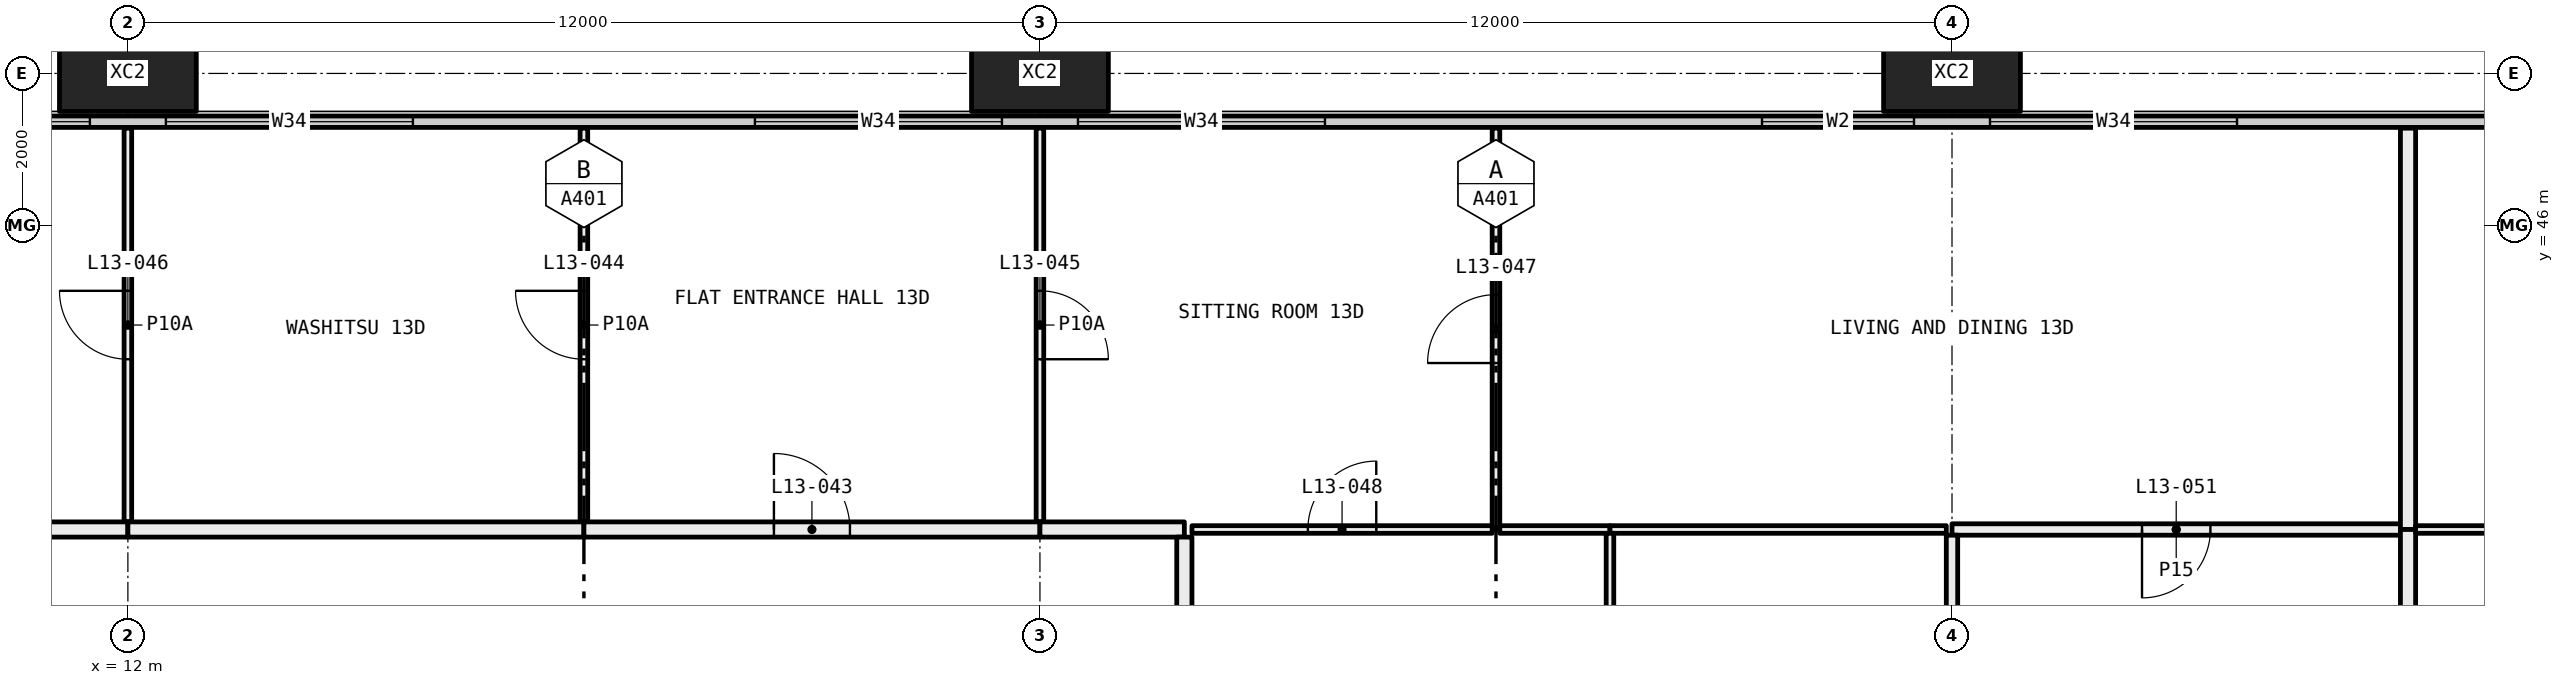
"""IFC4 building model, lengths in metres.
Left out: names, types, materials, properties, quantities, classifications, styles, units other than length and angle.
Written with IfcOpenShell. Run it as: python <this file> out.ifc"""

import sys

from ifc_helpers import new_model, si_unit, direction, frame, frame_2d, origin, origin_2d, place, context, subcontext, project, spatial, rectangle, hollow_rectangle, extrude, element, fill, save


model = new_model("IFC4")
c1 = context("Model", 3, precision=1e-05, world=origin(), true_north=direction((0.0, 1.0)))
c2 = subcontext(c1, "Body", "Model", "MODEL_VIEW")
j1 = project(units=[si_unit("LENGTHUNIT", "METRE"), si_unit("PLANEANGLEUNIT", "RADIAN")], contexts=[c1])
p1 = place(None, origin())
s1 = spatial("IfcSite", under=j1, at=p1, CompositionType="ELEMENT")
p2 = place(p1, origin())
s2 = spatial("IfcBuilding", under=s1, at=p2, CompositionType="ELEMENT")
p3 = place(p2, frame((0.0, 0.0, 57.6)))
s3 = spatial("IfcBuildingStorey", under=s2, at=p3, CompositionType="ELEMENT", Elevation=57.6)
for number, where, z_axis, x_axis in (
    (1, (12.0, 48.0, -0.4), (0.0, 0.0, 1.0), (1.0, 0.0, 0.0)),
    (2, (24.0, 48.0, -0.4), (0.0, 0.0, 1.0), (1.0, 0.0, 0.0)),
    (3, (36.0, 48.0, -0.4), (0.0, 0.0, 1.0), (1.0, 0.0, 0.0)),
):
    element("IfcColumn", number, at=place(p3, frame(where, z_axis=z_axis, x_axis=x_axis)), inside=s3, PredefinedType="COLUMN", context=c2, shape_type="SweptSolid", body=[
        extrude(hollow_rectangle(XDim=1.8, YDim=1.0, WallThickness=0.07, at=origin_2d()), origin(), (0.0, 0.0, 1.0), 3.45),
    ])
p4 = place(p3, frame((6.56, 47.365, 0.0), z_axis=(0.0, 0.0, 1.0), x_axis=(1.0, 0.0, 0.0)))
e4 = element("IfcWall", 4, at=p4, inside=s3, PredefinedType="ELEMENTEDWALL", context=c2, shape_type="SweptSolid", body=[
    extrude(rectangle(XDim=58.88, YDim=0.15, at=frame_2d((29.44, 0.0))), origin(), (0.0, 0.0, 1.0), 3.05),
])
p5 = place(p4, frame((0.44, 0.0, 0.45)))
e5 = element("IfcOpeningElement", 5, at=p5, cuts=e4, PredefinedType="OPENING", context=c2, shape_type="SweptSolid", body=[
    extrude(rectangle(XDim=4.5, YDim=2.55, at=frame_2d((2.25, 1.275))), frame((0.0, 0.085, 0.0), z_axis=(0.0, -1.0, 0.0), x_axis=(1.0, 0.0, 0.0)), (0.0, 0.0, 1.0), 0.17),
])
p6 = place(p4, frame((5.94, 0.0, 0.45)))
e6 = element("IfcOpeningElement", 6, at=p6, cuts=e4, PredefinedType="OPENING", context=c2, shape_type="SweptSolid", body=[
    extrude(rectangle(XDim=3.25, YDim=2.55, at=frame_2d((1.625, 1.275))), frame((0.0, 0.085, 0.0), z_axis=(0.0, -1.0, 0.0), x_axis=(1.0, 0.0, 0.0)), (0.0, 0.0, 1.0), 0.17),
])
p7 = place(p4, frame((13.69, 0.0, 0.45)))
e7 = element("IfcOpeningElement", 7, at=p7, cuts=e4, PredefinedType="OPENING", context=c2, shape_type="SweptSolid", body=[
    extrude(rectangle(XDim=3.25, YDim=2.55, at=frame_2d((1.625, 1.275))), frame((0.0, 0.085, 0.0), z_axis=(0.0, -1.0, 0.0), x_axis=(1.0, 0.0, 0.0)), (0.0, 0.0, 1.0), 0.17),
])
p8 = place(p4, frame((17.94, 0.0, 0.45)))
e8 = element("IfcOpeningElement", 8, at=p8, cuts=e4, PredefinedType="OPENING", context=c2, shape_type="SweptSolid", body=[
    extrude(rectangle(XDim=3.25, YDim=2.55, at=frame_2d((1.625, 1.275))), frame((0.0, 0.085, 0.0), z_axis=(0.0, -1.0, 0.0), x_axis=(1.0, 0.0, 0.0)), (0.0, 0.0, 1.0), 0.17),
])
p9 = place(p4, frame((26.94, 0.0, 0.45)))
e9 = element("IfcOpeningElement", 9, at=p9, cuts=e4, PredefinedType="OPENING", context=c2, shape_type="SweptSolid", body=[
    extrude(rectangle(XDim=2.0, YDim=2.55, at=frame_2d((1.0, 1.275))), frame((0.0, 0.085, 0.0), z_axis=(0.0, -1.0, 0.0), x_axis=(1.0, 0.0, 0.0)), (0.0, 0.0, 1.0), 0.17),
])
p10 = place(p4, frame((29.94, 0.0, 0.45)))
e10 = element("IfcOpeningElement", 10, at=p10, cuts=e4, PredefinedType="OPENING", context=c2, shape_type="SweptSolid", body=[
    extrude(rectangle(XDim=3.25, YDim=2.55, at=frame_2d((1.625, 1.275))), frame((0.0, 0.085, 0.0), z_axis=(0.0, -1.0, 0.0), x_axis=(1.0, 0.0, 0.0)), (0.0, 0.0, 1.0), 0.17),
])
p11 = place(p4, frame((37.69, 0.0, 0.45)))
e11 = element("IfcOpeningElement", 11, at=p11, cuts=e4, PredefinedType="OPENING", context=c2, shape_type="SweptSolid", body=[
    extrude(rectangle(XDim=3.25, YDim=2.55, at=frame_2d((1.625, 1.275))), frame((0.0, 0.085, 0.0), z_axis=(0.0, -1.0, 0.0), x_axis=(1.0, 0.0, 0.0)), (0.0, 0.0, 1.0), 0.17),
])
p12 = place(p4, frame((41.94, 0.0, 0.45)))
e12 = element("IfcOpeningElement", 12, at=p12, cuts=e4, PredefinedType="OPENING", context=c2, shape_type="SweptSolid", body=[
    extrude(rectangle(XDim=3.25, YDim=2.55, at=frame_2d((1.625, 1.275))), frame((0.0, 0.085, 0.0), z_axis=(0.0, -1.0, 0.0), x_axis=(1.0, 0.0, 0.0)), (0.0, 0.0, 1.0), 0.17),
])
p13 = place(p4, frame((50.94, 0.0, 0.45)))
e13 = element("IfcOpeningElement", 13, at=p13, cuts=e4, PredefinedType="OPENING", context=c2, shape_type="SweptSolid", body=[
    extrude(rectangle(XDim=2.0, YDim=2.55, at=frame_2d((1.0, 1.275))), frame((0.0, 0.085, 0.0), z_axis=(0.0, -1.0, 0.0), x_axis=(1.0, 0.0, 0.0)), (0.0, 0.0, 1.0), 0.17),
])
p14 = place(p4, frame((53.94, 0.0, 0.45)))
e14 = element("IfcOpeningElement", 14, at=p14, cuts=e4, PredefinedType="OPENING", context=c2, shape_type="SweptSolid", body=[
    extrude(rectangle(XDim=4.5, YDim=2.55, at=frame_2d((2.25, 1.275))), frame((0.0, 0.085, 0.0), z_axis=(0.0, -1.0, 0.0), x_axis=(1.0, 0.0, 0.0)), (0.0, 0.0, 1.0), 0.17),
])
p15 = place(p3, frame((12.0, 42.1, 0.0), z_axis=(0.0, 0.0, 1.0), x_axis=(0.0, 1.0, 0.0)))
e15 = element("IfcWall", 15, at=p15, inside=s3, PredefinedType="PARTITIONING", context=c2, shape_type="SweptSolid", body=[
    extrude(rectangle(XDim=5.18, YDim=0.1, at=frame_2d((2.59, 0.0))), origin(), (0.0, 0.0, 1.0), 3.05),
])
p16 = place(p15, frame((2.14, 0.0, 0.0)))
e16 = element("IfcOpeningElement", 16, at=p16, cuts=e15, PredefinedType="OPENING", context=c2, shape_type="SweptSolid", body=[
    extrude(rectangle(XDim=0.9, YDim=2.1, at=frame_2d((0.45, 1.05))), frame((0.0, 0.06, 0.0), z_axis=(0.0, -1.0, 0.0), x_axis=(1.0, 0.0, 0.0)), (0.0, 0.0, 1.0), 0.12),
])
p17 = place(p3, frame((10.1, 42.0, 0.0), z_axis=(0.0, 0.0, 1.0), x_axis=(1.0, 0.0, 0.0)))
e17 = element("IfcWall", 17, at=p17, inside=s3, PredefinedType="PARTITIONING", context=c2, shape_type="SweptSolid", body=[
    extrude(rectangle(XDim=1.9, YDim=0.2, at=frame_2d((0.95, 0.0))), origin(), (0.0, 0.0, 1.0), 3.05),
])
p18 = place(p3, frame((18.0, 42.1, 0.0), z_axis=(0.0, 0.0, 1.0), x_axis=(0.0, 1.0, 0.0)))
e18 = element("IfcWall", 18, at=p18, inside=s3, PredefinedType="PARTITIONING", context=c2, shape_type="SweptSolid", body=[
    extrude(rectangle(XDim=5.18, YDim=0.1, at=frame_2d((2.59, 0.0))), origin(), (0.0, 0.0, 1.0), 3.05),
])
p19 = place(p18, frame((2.14, 0.0, 0.0)))
e19 = element("IfcOpeningElement", 19, at=p19, cuts=e18, PredefinedType="OPENING", context=c2, shape_type="SweptSolid", body=[
    extrude(rectangle(XDim=0.9, YDim=2.1, at=frame_2d((0.45, 1.05))), frame((0.0, 0.06, 0.0), z_axis=(0.0, -1.0, 0.0), x_axis=(1.0, 0.0, 0.0)), (0.0, 0.0, 1.0), 0.12),
])
p20 = place(p3, frame((12.0, 42.0, 0.0), z_axis=(0.0, 0.0, 1.0), x_axis=(1.0, 0.0, 0.0)))
e20 = element("IfcWall", 20, at=p20, inside=s3, PredefinedType="PARTITIONING", context=c2, shape_type="SweptSolid", body=[
    extrude(rectangle(XDim=6.0, YDim=0.2, at=frame_2d((3.0, 0.0))), origin(), (0.0, 0.0, 1.0), 3.05),
])
p21 = place(p3, frame((24.0, 42.1, 0.0), z_axis=(0.0, 0.0, 1.0), x_axis=(0.0, 1.0, 0.0)))
e21 = element("IfcWall", 21, at=p21, inside=s3, PredefinedType="PARTITIONING", context=c2, shape_type="SweptSolid", body=[
    extrude(rectangle(XDim=5.18, YDim=0.1, at=frame_2d((2.59, 0.0))), origin(), (0.0, 0.0, 1.0), 3.05),
])
p22 = place(p21, frame((2.14, 0.0, 0.0)))
e22 = element("IfcOpeningElement", 22, at=p22, cuts=e21, PredefinedType="OPENING", context=c2, shape_type="SweptSolid", body=[
    extrude(rectangle(XDim=0.9, YDim=2.1, at=frame_2d((0.45, 1.05))), frame((0.0, 0.06, 0.0), z_axis=(0.0, -1.0, 0.0), x_axis=(1.0, 0.0, 0.0)), (0.0, 0.0, 1.0), 0.12),
])
p23 = place(p3, frame((18.0, 42.0, 0.0), z_axis=(0.0, 0.0, 1.0), x_axis=(1.0, 0.0, 0.0)))
e23 = element("IfcWall", 23, at=p23, inside=s3, PredefinedType="PARTITIONING", context=c2, shape_type="SweptSolid", body=[
    extrude(rectangle(XDim=6.0, YDim=0.2, at=frame_2d((3.0, 0.0))), origin(), (0.0, 0.0, 1.0), 3.05),
])
p24 = place(p23, frame((2.5, 0.0, 0.0)))
e24 = element("IfcOpeningElement", 24, at=p24, cuts=e23, PredefinedType="OPENING", context=c2, shape_type="SweptSolid", body=[
    extrude(rectangle(XDim=1.0, YDim=2.1, at=frame_2d((0.5, 1.05))), frame((0.0, 0.11, 0.0), z_axis=(0.0, -1.0, 0.0), x_axis=(1.0, 0.0, 0.0)), (0.0, 0.0, 1.0), 0.22),
])
p25 = place(p3, frame((30.0, 42.0, 0.0), z_axis=(0.0, 0.0, 1.0), x_axis=(0.0, 1.0, 0.0)))
e25 = element("IfcWall", 25, at=p25, inside=s3, PredefinedType="PARTITIONING", context=c2, shape_type="SweptSolid", body=[
    extrude(rectangle(XDim=5.28, YDim=0.1, at=frame_2d((2.64, 0.0))), origin(), (0.0, 0.0, 1.0), 3.05),
])
p26 = place(p25, frame((2.19, 0.0, 0.0)))
e26 = element("IfcOpeningElement", 26, at=p26, cuts=e25, PredefinedType="OPENING", context=c2, shape_type="SweptSolid", body=[
    extrude(rectangle(XDim=0.9, YDim=2.1, at=frame_2d((0.45, 1.05))), frame((0.0, 0.06, 0.0), z_axis=(0.0, -1.0, 0.0), x_axis=(1.0, 0.0, 0.0)), (0.0, 0.0, 1.0), 0.12),
])
p27 = place(p3, frame((26.0, 42.0, 0.0), z_axis=(0.0, 0.0, 1.0), x_axis=(1.0, 0.0, 0.0)))
e27 = element("IfcWall", 27, at=p27, inside=s3, PredefinedType="PARTITIONING", context=c2, shape_type="SweptSolid", body=[
    extrude(rectangle(XDim=3.95, YDim=0.1, at=frame_2d((1.975, 0.0))), origin(), (0.0, 0.0, 1.0), 3.05),
])
p28 = place(p27, frame((1.525, 0.0, 0.0)))
e28 = element("IfcOpeningElement", 28, at=p28, cuts=e27, PredefinedType="OPENING", context=c2, shape_type="SweptSolid", body=[
    extrude(rectangle(XDim=0.9, YDim=2.1, at=frame_2d((0.45, 1.05))), frame((0.0, 0.06, 0.0), z_axis=(0.0, -1.0, 0.0), x_axis=(1.0, 0.0, 0.0)), (0.0, 0.0, 1.0), 0.12),
])
p29 = place(p3, frame((24.0, 42.0, 0.0), z_axis=(0.0, 0.0, 1.0), x_axis=(1.0, 0.0, 0.0)))
e29 = element("IfcWall", 29, at=p29, inside=s3, PredefinedType="PARTITIONING", context=c2, shape_type="SweptSolid", body=[
    extrude(rectangle(XDim=1.9, YDim=0.2, at=frame_2d((0.95, 0.0))), origin(), (0.0, 0.0, 1.0), 3.05),
])
p30 = place(p3, frame((30.05, 42.0, 0.0), z_axis=(0.0, 0.0, 1.0), x_axis=(1.0, 0.0, 0.0)))
e30 = element("IfcWall", 30, at=p30, inside=s3, PredefinedType="PARTITIONING", context=c2, shape_type="SweptSolid", body=[
    extrude(rectangle(XDim=1.45, YDim=0.1, at=frame_2d((0.725, 0.0))), origin(), (0.0, 0.0, 1.0), 3.05),
])
p31 = place(p3, frame((31.5, 42.0, 0.0), z_axis=(0.0, 0.0, 1.0), x_axis=(1.0, 0.0, 0.0)))
e31 = element("IfcWall", 31, at=p31, inside=s3, PredefinedType="PARTITIONING", context=c2, shape_type="SweptSolid", body=[
    extrude(rectangle(XDim=4.425, YDim=0.1, at=frame_2d((2.212, 0.0))), origin(), (0.0, 0.0, 1.0), 2.45),
])
p32 = place(p3, frame((36.0, 42.0, 0.0), z_axis=(0.0, 0.0, 1.0), x_axis=(1.0, 0.0, 0.0)))
e32 = element("IfcWall", 32, at=p32, inside=s3, PredefinedType="PARTITIONING", context=c2, shape_type="SweptSolid", body=[
    extrude(rectangle(XDim=5.9, YDim=0.15, at=frame_2d((2.95, 0.0))), origin(), (0.0, 0.0, 1.0), 2.45),
])
p33 = place(p32, frame((2.5, 0.0, 0.0)))
e33 = element("IfcOpeningElement", 33, at=p33, cuts=e32, PredefinedType="OPENING", context=c2, shape_type="SweptSolid", body=[
    extrude(rectangle(XDim=0.9, YDim=2.1, at=frame_2d((0.45, 1.05))), frame((0.0, 0.085, 0.0), z_axis=(0.0, -1.0, 0.0), x_axis=(1.0, 0.0, 0.0)), (0.0, 0.0, 1.0), 0.17),
])
p34 = place(p3, frame((42.0, 42.0, 0.0), z_axis=(0.0, 0.0, 1.0), x_axis=(0.0, 1.0, 0.0)))
e34 = element("IfcWall", 34, at=p34, inside=s3, PredefinedType="PARTITIONING", context=c2, shape_type="SweptSolid", body=[
    extrude(rectangle(XDim=5.28, YDim=0.2, at=frame_2d((2.64, 0.0))), origin(), (0.0, 0.0, 1.0), 3.05),
])
p35 = place(p3, frame((31.5, 36.1, 0.0), z_axis=(0.0, 0.0, 1.0), x_axis=(0.0, 1.0, 0.0)))
e35 = element("IfcWall", 35, at=p35, inside=s3, PredefinedType="PARTITIONING", context=c2, shape_type="SweptSolid", body=[
    extrude(rectangle(XDim=5.85, YDim=0.1, at=frame_2d((2.925, 0.0))), origin(), (0.0, 0.0, 1.0), 3.05),
])
p36 = place(p35, frame((2.475, 0.0, 0.0)))
e36 = element("IfcOpeningElement", 36, at=p36, cuts=e35, PredefinedType="OPENING", context=c2, shape_type="SweptSolid", body=[
    extrude(rectangle(XDim=0.9, YDim=2.1, at=frame_2d((0.45, 1.05))), frame((0.0, 0.06, 0.0), z_axis=(0.0, -1.0, 0.0), x_axis=(1.0, 0.0, 0.0)), (0.0, 0.0, 1.0), 0.12),
])
p37 = place(p3, frame((25.9, 41.9, 0.0), z_axis=(0.0, 0.0, 1.0), x_axis=(0.0, -1.0, 0.0)))
e37 = element("IfcWall", 37, at=p37, inside=s3, PredefinedType="PARTITIONING", context=c2, shape_type="SweptSolid", body=[
    extrude(rectangle(XDim=6.2, YDim=0.2, at=frame_2d((3.1, 0.0))), origin(), (0.0, 0.0, 1.0), 2.45),
])
p38 = place(p3, frame((36.0, 38.1, 0.0), z_axis=(0.0, 0.0, 1.0), x_axis=(0.0, 1.0, 0.0)))
e38 = element("IfcWall", 38, at=p38, inside=s3, PredefinedType="PARTITIONING", context=c2, shape_type="SweptSolid", body=[
    extrude(rectangle(XDim=3.825, YDim=0.15, at=frame_2d((1.913, 0.0))), origin(), (0.0, 0.0, 1.0), 2.45),
])
p39 = place(p3, frame((42.0, 38.1, 0.0), z_axis=(0.0, 0.0, 1.0), x_axis=(0.0, 1.0, 0.0)))
e39 = element("IfcWall", 39, at=p39, inside=s3, PredefinedType="PARTITIONING", context=c2, shape_type="SweptSolid", body=[
    extrude(rectangle(XDim=3.9, YDim=0.2, at=frame_2d((1.95, 0.0))), origin(), (0.0, 0.0, 1.0), 3.05),
])
p40 = place(p3, frame((42.1, 42.0, 0.0), z_axis=(0.0, 0.0, 1.0), x_axis=(1.0, 0.0, 0.0)))
e40 = element("IfcWall", 40, at=p40, inside=s3, PredefinedType="PARTITIONING", context=c2, shape_type="SweptSolid", body=[
    extrude(rectangle(XDim=3.9, YDim=0.1, at=frame_2d((1.95, 0.0))), origin(), (0.0, 0.0, 1.0), 3.05),
])
p41 = place(p40, frame((1.5, 0.0, 0.0)))
e41 = element("IfcOpeningElement", 41, at=p41, cuts=e40, PredefinedType="OPENING", context=c2, shape_type="SweptSolid", body=[
    extrude(rectangle(XDim=0.9, YDim=2.1, at=frame_2d((0.45, 1.05))), frame((0.0, 0.06, 0.0), z_axis=(0.0, -1.0, 0.0), x_axis=(1.0, 0.0, 0.0)), (0.0, 0.0, 1.0), 0.12),
])
p42 = place(p5, origin())
e42 = element("IfcWindow", 42, at=p42, inside=s3, PartitioningType="SINGLE_PANEL", PredefinedType="WINDOW", context=c2, shape_type="SweptSolid", body=[
    extrude(rectangle(XDim=4.5, YDim=2.55, at=frame_2d((2.25, 1.275))), frame((0.0, 0.03, 0.0), z_axis=(0.0, -1.0, 0.0), x_axis=(1.0, 0.0, 0.0)), (0.0, 0.0, 1.0), 0.06),
])
fill(e5, e42)
p43 = place(p6, origin())
e43 = element("IfcWindow", 43, at=p43, inside=s3, PartitioningType="SINGLE_PANEL", PredefinedType="WINDOW", context=c2, shape_type="SweptSolid", body=[
    extrude(rectangle(XDim=3.25, YDim=2.55, at=frame_2d((1.625, 1.275))), frame((0.0, 0.03, 0.0), z_axis=(0.0, -1.0, 0.0), x_axis=(1.0, 0.0, 0.0)), (0.0, 0.0, 1.0), 0.06),
])
fill(e6, e43)
p44 = place(p7, origin())
e44 = element("IfcWindow", 44, at=p44, inside=s3, PartitioningType="SINGLE_PANEL", PredefinedType="WINDOW", context=c2, shape_type="SweptSolid", body=[
    extrude(rectangle(XDim=3.25, YDim=2.55, at=frame_2d((1.625, 1.275))), frame((0.0, 0.03, 0.0), z_axis=(0.0, -1.0, 0.0), x_axis=(1.0, 0.0, 0.0)), (0.0, 0.0, 1.0), 0.06),
])
fill(e7, e44)
p45 = place(p8, origin())
e45 = element("IfcWindow", 45, at=p45, inside=s3, PartitioningType="SINGLE_PANEL", PredefinedType="WINDOW", context=c2, shape_type="SweptSolid", body=[
    extrude(rectangle(XDim=3.25, YDim=2.55, at=frame_2d((1.625, 1.275))), frame((0.0, 0.03, 0.0), z_axis=(0.0, -1.0, 0.0), x_axis=(1.0, 0.0, 0.0)), (0.0, 0.0, 1.0), 0.06),
])
fill(e8, e45)
p46 = place(p9, origin())
e46 = element("IfcWindow", 46, at=p46, inside=s3, PartitioningType="SINGLE_PANEL", PredefinedType="WINDOW", context=c2, shape_type="SweptSolid", body=[
    extrude(rectangle(XDim=2.0, YDim=2.55, at=frame_2d((1.0, 1.275))), frame((0.0, 0.03, 0.0), z_axis=(0.0, -1.0, 0.0), x_axis=(1.0, 0.0, 0.0)), (0.0, 0.0, 1.0), 0.06),
])
fill(e9, e46)
p47 = place(p10, origin())
e47 = element("IfcWindow", 47, at=p47, inside=s3, PartitioningType="SINGLE_PANEL", PredefinedType="WINDOW", context=c2, shape_type="SweptSolid", body=[
    extrude(rectangle(XDim=3.25, YDim=2.55, at=frame_2d((1.625, 1.275))), frame((0.0, 0.03, 0.0), z_axis=(0.0, -1.0, 0.0), x_axis=(1.0, 0.0, 0.0)), (0.0, 0.0, 1.0), 0.06),
])
fill(e10, e47)
p48 = place(p24, origin())
e48 = element("IfcDoor", 48, at=p48, inside=s3, OperationType="SINGLE_SWING_RIGHT", PredefinedType="DOOR", context=c2, shape_type="SweptSolid", body=[
    extrude(rectangle(XDim=1.0, YDim=2.1, at=frame_2d((0.5, 1.05))), frame((0.0, 0.025, 0.0), z_axis=(0.0, -1.0, 0.0), x_axis=(1.0, 0.0, 0.0)), (0.0, 0.0, 1.0), 0.05),
])
fill(e24, e48)
p49 = place(p19, origin())
e49 = element("IfcDoor", 49, at=p49, inside=s3, OperationType="SINGLE_SWING_LEFT", PredefinedType="DOOR", context=c2, shape_type="SweptSolid", body=[
    extrude(rectangle(XDim=0.9, YDim=2.1, at=frame_2d((0.45, 1.05))), frame((0.0, 0.025, 0.0), z_axis=(0.0, -1.0, 0.0), x_axis=(1.0, 0.0, 0.0)), (0.0, 0.0, 1.0), 0.05),
])
fill(e19, e49)
p50 = place(p22, frame((0.9, 0.0, 0.0), x_axis=(-1.0, 0.0, 0.0)))
e50 = element("IfcDoor", 50, at=p50, inside=s3, OperationType="SINGLE_SWING_LEFT", PredefinedType="DOOR", context=c2, shape_type="SweptSolid", body=[
    extrude(rectangle(XDim=0.9, YDim=2.1, at=frame_2d((0.45, 1.05))), frame((0.0, 0.025, 0.0), z_axis=(0.0, -1.0, 0.0), x_axis=(1.0, 0.0, 0.0)), (0.0, 0.0, 1.0), 0.05),
])
fill(e22, e50)
p51 = place(p16, origin())
e51 = element("IfcDoor", 51, at=p51, inside=s3, OperationType="SINGLE_SWING_LEFT", PredefinedType="DOOR", context=c2, shape_type="SweptSolid", body=[
    extrude(rectangle(XDim=0.9, YDim=2.1, at=frame_2d((0.45, 1.05))), frame((0.0, 0.025, 0.0), z_axis=(0.0, -1.0, 0.0), x_axis=(1.0, 0.0, 0.0)), (0.0, 0.0, 1.0), 0.05),
])
fill(e16, e51)
p52 = place(p26, origin())
e52 = element("IfcDoor", 52, at=p52, inside=s3, OperationType="SINGLE_SWING_RIGHT", PredefinedType="DOOR", context=c2, shape_type="SweptSolid", body=[
    extrude(rectangle(XDim=0.9, YDim=2.1, at=frame_2d((0.45, 1.05))), frame((0.0, 0.025, 0.0), z_axis=(0.0, -1.0, 0.0), x_axis=(1.0, 0.0, 0.0)), (0.0, 0.0, 1.0), 0.05),
])
fill(e26, e52)
p53 = place(p28, origin())
e53 = element("IfcDoor", 53, at=p53, inside=s3, OperationType="SINGLE_SWING_LEFT", PredefinedType="DOOR", context=c2, shape_type="SweptSolid", body=[
    extrude(rectangle(XDim=0.9, YDim=2.1, at=frame_2d((0.45, 1.05))), frame((0.0, 0.025, 0.0), z_axis=(0.0, -1.0, 0.0), x_axis=(1.0, 0.0, 0.0)), (0.0, 0.0, 1.0), 0.05),
])
fill(e28, e53)
p54 = place(p33, frame((0.9, 0.0, 0.0), x_axis=(-1.0, 0.0, 0.0)))
e54 = element("IfcDoor", 54, at=p54, inside=s3, OperationType="SINGLE_SWING_LEFT", PredefinedType="DOOR", context=c2, shape_type="SweptSolid", body=[
    extrude(rectangle(XDim=0.9, YDim=2.1, at=frame_2d((0.45, 1.05))), frame((0.0, 0.025, 0.0), z_axis=(0.0, -1.0, 0.0), x_axis=(1.0, 0.0, 0.0)), (0.0, 0.0, 1.0), 0.05),
])
fill(e33, e54)
save(model, sys.argv[1])
